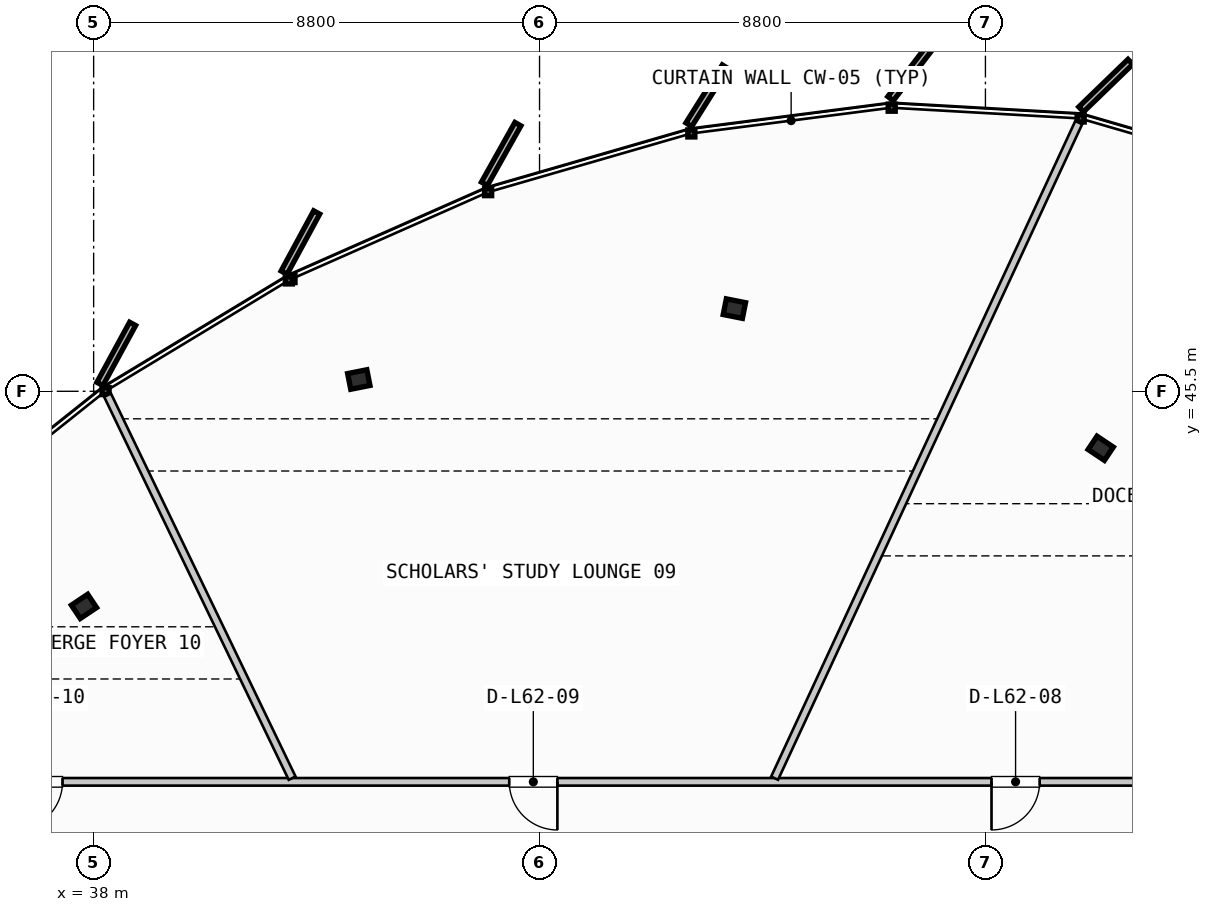
"""IFC4 building model, lengths in metres.
Left out: names, types, materials, properties, quantities, classifications, styles, units other than length and angle.
Written with IfcOpenShell. Run it as: python <this file> out.ifc"""

import sys

from ifc_helpers import new_model, si_unit, direction, frame, frame_2d, origin, origin_2d, place, context, subcontext, project, spatial, rectangle, i_section, extrude, source, transform, mapped, element, fill, save


model = new_model("IFC4")
c1 = context("Model", 3, precision=1e-05, world=origin(), true_north=direction((0.0, 1.0)))
c2 = subcontext(c1, "Body", "Model", "MODEL_VIEW")
j1 = project(units=[si_unit("LENGTHUNIT", "METRE"), si_unit("PLANEANGLEUNIT", "RADIAN")], contexts=[c1])
p1 = place(None, origin())
s1 = spatial("IfcSite", under=j1, at=p1, CompositionType="ELEMENT")
p2 = place(p1, origin())
s2 = spatial("IfcBuilding", under=s1, at=p2, CompositionType="ELEMENT")
p3 = place(p2, frame((0.0, 0.0, 238.75)))
s3 = spatial("IfcBuildingStorey", under=s2, at=p3, CompositionType="ELEMENT", Elevation=238.75)
m1 = source(origin(), c2, "Body", "SweptSolid", [
    extrude(i_section(OverallWidth=0.387, OverallDepth=0.316, WebThickness=0.019, FlangeThickness=0.028, FilletRadius=0.015, at=origin_2d()), origin(), (0.0, 0.0, 1.0), 3.21),
])
for number, where, z_axis, x_axis in (
    (1, (57.875, 44.375, 0.0), (0.0, 0.0, 1.0), (0.556, 0.831, 0.0)),
    (2, (50.645, 47.132, 0.0), (0.0, 0.0, 1.0), (0.195, 0.981, 0.0)),
    (3, (43.233, 45.732, 0.0), (0.0, 0.0, 1.0), (-0.195, 0.981, 0.0)),
    (4, (37.81, 41.255, 0.0), (0.0, 0.0, 1.0), (-0.556, 0.831, 0.0)),
):
    element("IfcColumn", number, at=place(p3, frame(where, z_axis=z_axis, x_axis=x_axis)), inside=s3, PredefinedType="COLUMN", context=c2, shape_type="MappedRepresentation", body=[
        mapped(m1, transform((0.0, 0.0, 0.0), scale=1.0)),
    ])
p4 = place(p3, frame((61.564, 37.793, 0.0), z_axis=(0.0, 0.0, 1.0), x_axis=(-1.0, 0.0, 0.0)))
e5 = element("IfcWall", 5, at=p4, inside=s3, PredefinedType="PARTITIONING", context=c2, shape_type="SweptSolid", body=[
    extrude(rectangle(XDim=30.274, YDim=0.15, at=frame_2d((15.137, 0.0))), origin(), (0.0, 0.0, 1.0), 2.28),
])
p5 = place(p4, frame((4.894, 0.0, 0.0)))
e6 = element("IfcOpeningElement", 6, at=p5, cuts=e5, PredefinedType="OPENING", context=c2, shape_type="SweptSolid", body=[
    extrude(rectangle(XDim=0.95, YDim=2.15, at=frame_2d((0.475, 1.075))), frame((0.0, 0.085, 0.0), z_axis=(0.0, -1.0, 0.0), x_axis=(1.0, 0.0, 0.0)), (0.0, 0.0, 1.0), 0.17),
])
p6 = place(p4, frame((14.412, 0.0, 0.0)))
e7 = element("IfcOpeningElement", 7, at=p6, cuts=e5, PredefinedType="OPENING", context=c2, shape_type="SweptSolid", body=[
    extrude(rectangle(XDim=0.95, YDim=2.15, at=frame_2d((0.475, 1.075))), frame((0.0, 0.085, 0.0), z_axis=(0.0, -1.0, 0.0), x_axis=(1.0, 0.0, 0.0)), (0.0, 0.0, 1.0), 0.17),
])
p7 = place(p4, frame((24.178, 0.0, 0.0)))
e8 = element("IfcOpeningElement", 8, at=p7, cuts=e5, PredefinedType="OPENING", context=c2, shape_type="SweptSolid", body=[
    extrude(rectangle(XDim=0.95, YDim=2.15, at=frame_2d((0.475, 1.075))), frame((0.0, 0.085, 0.0), z_axis=(0.0, -1.0, 0.0), x_axis=(1.0, 0.0, 0.0)), (0.0, 0.0, 1.0), 0.17),
])
p8 = place(p3, frame((51.439, 37.865, 0.0), z_axis=(0.0, 0.0, 1.0), x_axis=(0.420885460342, 0.907113790697, 0.0)))
e9 = element("IfcWall", 9, at=p8, inside=s3, PredefinedType="PARTITIONING", context=c2, shape_type="SweptSolid", body=[
    extrude(rectangle(XDim=14.261, YDim=0.15, at=frame_2d((7.131, 0.0))), origin(), (0.0, 0.0, 1.0), 2.28),
])
p9 = place(p3, frame((41.917, 37.865, 0.0), z_axis=(0.0, 0.0, 1.0), x_axis=(-0.434176915766, 0.900827622698, 0.0)))
e10 = element("IfcWall", 10, at=p9, inside=s3, PredefinedType="PARTITIONING", context=c2, shape_type="SweptSolid", body=[
    extrude(rectangle(XDim=8.39, YDim=0.15, at=frame_2d((4.195, 0.0))), origin(), (0.0, 0.0, 1.0), 2.28),
])
m2 = source(origin(), c2, "Body", "SweptSolid", [
    extrude(rectangle(XDim=0.95, YDim=2.15, at=frame_2d((0.475, 1.075))), frame((0.0, 0.025, 0.0), z_axis=(0.0, -1.0, 0.0), x_axis=(1.0, 0.0, 0.0)), (0.0, 0.0, 1.0), 0.05),
])
p10 = place(p5, origin())
e11 = element("IfcDoor", 11, at=p10, inside=s3, OperationType="SINGLE_SWING_RIGHT", PredefinedType="DOOR", context=c2, shape_type="MappedRepresentation", body=[
    mapped(m2, transform((0.0, 0.0, 0.0), scale=1.0)),
])
fill(e6, e11)
p11 = place(p6, origin())
e12 = element("IfcDoor", 12, at=p11, inside=s3, OperationType="SINGLE_SWING_LEFT", PredefinedType="DOOR", context=c2, shape_type="MappedRepresentation", body=[
    mapped(m2, transform((0.0, 0.0, 0.0), scale=1.0)),
])
fill(e7, e12)
p12 = place(p7, origin())
e13 = element("IfcDoor", 13, at=p12, inside=s3, OperationType="SINGLE_SWING_RIGHT", PredefinedType="DOOR", context=c2, shape_type="MappedRepresentation", body=[
    mapped(m2, transform((0.0, 0.0, 0.0), scale=1.0)),
])
fill(e8, e13)
save(model, sys.argv[1])
